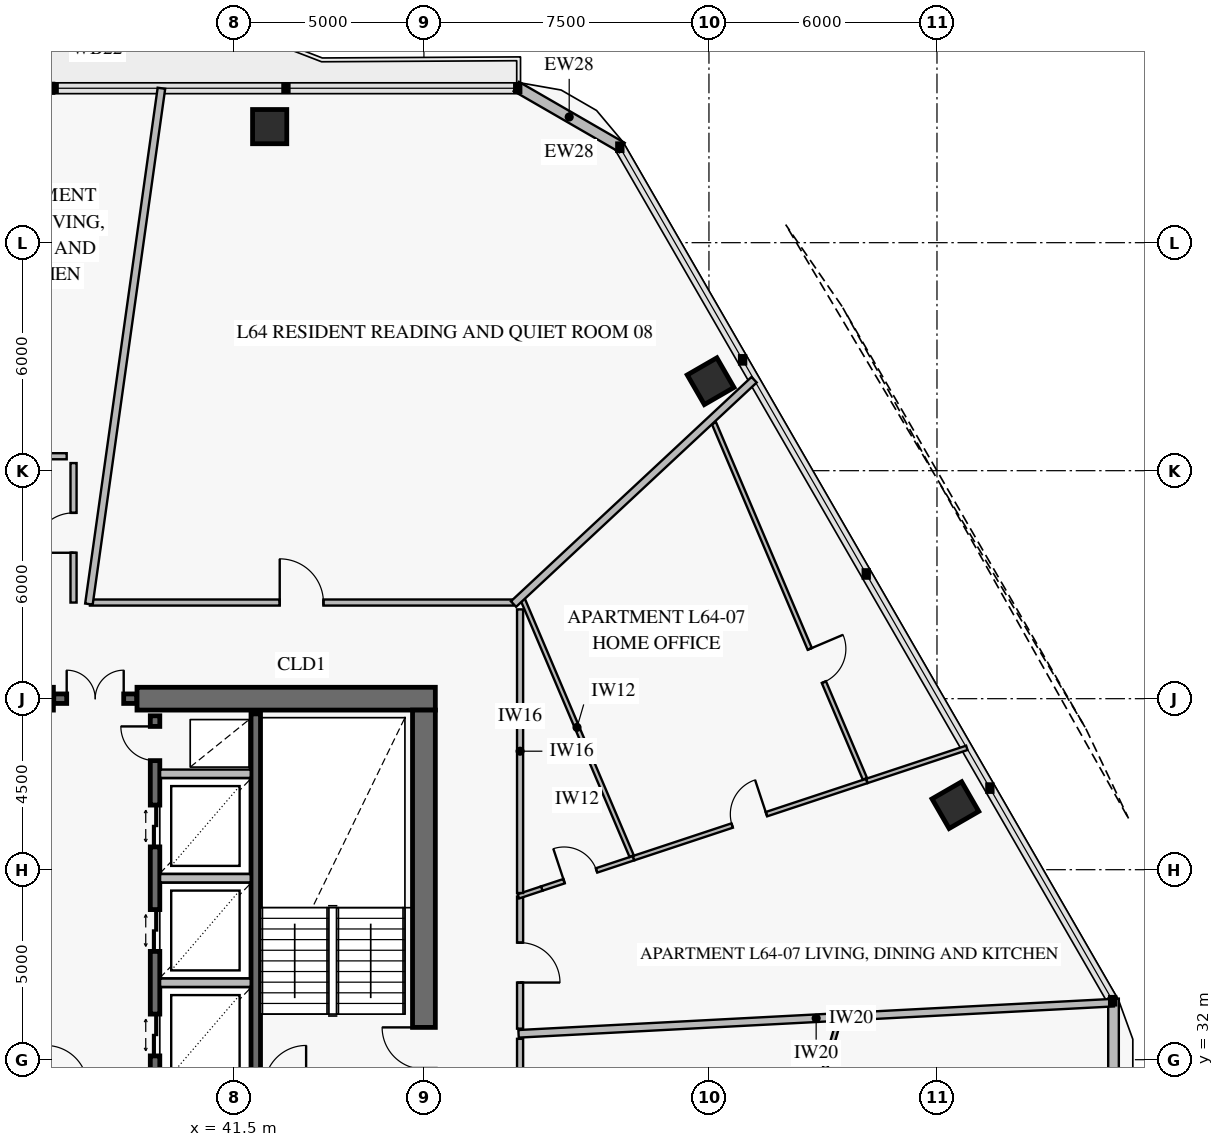
"""IFC4 building model, lengths in metres.
Left out: names, types, materials, properties, quantities, classifications, styles, units other than length and angle.
Written with IfcOpenShell. Run it as: python <this file> out.ifc"""

import sys

from ifc_helpers import new_model, si_unit, direction, frame, frame_2d, origin, origin_2d, place, context, subcontext, project, spatial, rectangle, extrude, element, fill, save


model = new_model("IFC4")
c1 = context("Model", 3, precision=1e-05, world=origin(), true_north=direction((0.0, 1.0)))
c2 = subcontext(c1, "Body", "Model", "MODEL_VIEW")
j1 = project(units=[si_unit("LENGTHUNIT", "METRE"), si_unit("PLANEANGLEUNIT", "RADIAN")], contexts=[c1])
p1 = place(None, origin())
s1 = spatial("IfcSite", under=j1, at=p1, CompositionType="ELEMENT")
p2 = place(p1, origin())
s2 = spatial("IfcBuilding", under=s1, at=p2, CompositionType="ELEMENT")
p3 = place(p2, frame((0.0, 0.0, 254.0)))
s3 = spatial("IfcBuildingStorey", under=s2, at=p3, CompositionType="ELEMENT", Elevation=254.0)
p4 = place(p3, frame((46.8, 41.5, 0.0), z_axis=(0.0, 0.0, 1.0), x_axis=(-1.0, 0.0, 0.0)))
e1 = element("IfcWall", 1, at=p4, inside=s3, PredefinedType="SHEAR", context=c2, shape_type="SweptSolid", body=[
    extrude(rectangle(XDim=7.85, YDim=0.6, at=frame_2d((3.925, 0.0))), origin(), (0.0, 0.0, 1.0), 3.8),
])
p5 = place(p3, frame((36.75, 41.5, 0.0), z_axis=(0.0, 0.0, 1.0), x_axis=(-1.0, 0.0, 0.0)))
e2 = element("IfcWall", 2, at=p5, inside=s3, PredefinedType="SHEAR", context=c2, shape_type="SweptSolid", body=[
    extrude(rectangle(XDim=11.55, YDim=0.6, at=frame_2d((5.775, 0.0))), origin(), (0.0, 0.0, 1.0), 3.8),
])
p6 = place(p5, frame((4.25, 0.0, 0.0)))
e3 = element("IfcOpeningElement", 3, at=p6, cuts=e2, PredefinedType="OPENING", context=c2, shape_type="SweptSolid", body=[
    extrude(rectangle(XDim=1.1, YDim=2.15, at=frame_2d((0.55, 1.075))), frame((0.0, 0.312, 0.0), z_axis=(0.0, -1.0, 0.0), x_axis=(1.0, 0.0, 0.0)), (0.0, 0.0, 1.0), 0.624),
])
p7 = place(p3, frame((46.5, 22.8, 0.0), z_axis=(0.0, 0.0, 1.0), x_axis=(0.0, 1.0, 0.0)))
e4 = element("IfcWall", 4, at=p7, inside=s3, PredefinedType="SHEAR", context=c2, shape_type="SweptSolid", body=[
    extrude(rectangle(XDim=18.4, YDim=0.6, at=frame_2d((9.2, 0.0))), origin(), (0.0, 0.0, 1.0), 3.8),
])
p8 = place(p7, frame((8.95, 0.0, 0.0)))
e5 = element("IfcOpeningElement", 5, at=p8, cuts=e4, PredefinedType="OPENING", context=c2, shape_type="SweptSolid", body=[
    extrude(rectangle(XDim=1.1, YDim=2.15, at=frame_2d((0.55, 1.075))), frame((0.0, 0.312, 0.0), z_axis=(0.0, -1.0, 0.0), x_axis=(1.0, 0.0, 0.0)), (0.0, 0.0, 1.0), 0.624),
])
for number, where, z_axis, x_axis in (
    (6, (60.485, 38.699, 0.0), (0.0, 0.0, 1.0), (-0.5, 0.866, 0.0)),
    (7, (54.044, 49.855, 0.0), (0.0, 0.0, 1.0), (-0.5, 0.866, 0.0)),
    (8, (42.441, 56.554, 0.0), (0.0, 0.0, 1.0), (-1.0, 0.0, 0.0)),
):
    element("IfcColumn", number, at=place(p3, frame(where, z_axis=z_axis, x_axis=x_axis)), inside=s3, PredefinedType="COLUMN", context=c2, shape_type="SweptSolid", body=[
        extrude(rectangle(XDim=0.9, YDim=0.9, at=origin_2d()), origin(), (0.0, 0.0, 1.0), 3.55),
    ])
p9 = place(p3, frame((34.98, 57.564, 0.0), z_axis=(0.0, 0.0, 1.0), x_axis=(1.0, 0.0, 0.0)))
e9 = element("IfcWall", 9, at=p9, inside=s3, PredefinedType="SOLIDWALL", context=c2, shape_type="SweptSolid", body=[
    extrude(rectangle(XDim=1.79, YDim=0.28, at=frame_2d((0.895, 0.0))), origin(), (0.0, 0.0, 1.0), 3.55),
])
p10 = place(p9, frame((0.345, 0.0, 0.0)))
e10 = element("IfcOpeningElement", 10, at=p10, cuts=e9, PredefinedType="OPENING", context=c2, shape_type="SweptSolid", body=[
    extrude(rectangle(XDim=1.1, YDim=2.2, at=frame_2d((0.55, 1.1))), frame((0.0, 0.152, 0.0), z_axis=(0.0, -1.0, 0.0), x_axis=(1.0, 0.0, 0.0)), (0.0, 0.0, 1.0), 0.304),
])
for number, where, z_axis, x_axis in (
    (11, (48.93, 57.611, 0.0), (0.0, 0.0, 1.0), (0.866, -0.5, 0.0)),
    (12, (64.645, 33.607, 0.0), (0.0, 0.0, 1.0), (0.0, -1.0, 0.0)),
):
    element("IfcWall", number, at=place(p3, frame(where, z_axis=z_axis, x_axis=x_axis)), inside=s3, PredefinedType="SOLIDWALL", context=c2, shape_type="SweptSolid", body=[
        extrude(rectangle(XDim=3.215, YDim=0.28, at=frame_2d((1.607, 0.0))), origin(), (0.0, 0.0, 1.0), 3.55),
    ])
p11 = place(p3, frame((36.76, 41.5, 0.0), z_axis=(0.0, 0.0, 1.0), x_axis=(1.0, 0.0, 0.0)))
e13 = element("IfcWall", 13, at=p11, inside=s3, PredefinedType="SOLIDWALL", context=c2, shape_type="SweptSolid", body=[
    extrude(rectangle(XDim=2.18, YDim=0.25, at=frame_2d((1.09, 0.0))), origin(), (0.0, 0.0, 1.0), 3.8),
])
p12 = place(p11, frame((0.34, 0.0, 0.0)))
e14 = element("IfcOpeningElement", 14, at=p12, cuts=e13, PredefinedType="OPENING", context=c2, shape_type="SweptSolid", body=[
    extrude(rectangle(XDim=1.5, YDim=2.15, at=frame_2d((0.75, 1.075))), frame((0.0, 0.137, 0.0), z_axis=(0.0, -1.0, 0.0), x_axis=(1.0, 0.0, 0.0)), (0.0, 0.0, 1.0), 0.274),
])
p13 = place(p3, frame((42.075, 31.4, 0.0), z_axis=(0.0, 0.0, 1.0), x_axis=(0.0, 1.0, 0.0)))
e15 = element("IfcWall", 15, at=p13, inside=s3, PredefinedType="SOLIDWALL", context=c2, shape_type="SweptSolid", body=[
    extrude(rectangle(XDim=9.7, YDim=0.25, at=frame_2d((4.85, 0.0))), origin(), (0.0, 0.0, 1.0), 3.8),
])
p14 = place(p3, frame((39.425, 31.4, 0.0), z_axis=(0.0, 0.0, 1.0), x_axis=(0.0, 1.0, 0.0)))
e16 = element("IfcWall", 16, at=p14, inside=s3, PredefinedType="SOLIDWALL", context=c2, shape_type="SweptSolid", body=[
    extrude(rectangle(XDim=9.65, YDim=0.25, at=frame_2d((4.825, 0.0))), origin(), (0.0, 0.0, 1.0), 3.8),
])
p15 = place(p14, frame((0.7, 0.0, 0.0)))
e17 = element("IfcOpeningElement", 17, at=p15, cuts=e16, PredefinedType="OPENING", context=c2, shape_type="SweptSolid", body=[
    extrude(rectangle(XDim=1.1, YDim=2.2, at=frame_2d((0.55, 1.1))), frame((0.0, 0.137, 0.0), z_axis=(0.0, -1.0, 0.0), x_axis=(1.0, 0.0, 0.0)), (0.0, 0.0, 1.0), 0.274),
])
p16 = place(p14, frame((3.45, 0.0, 0.0)))
e18 = element("IfcOpeningElement", 18, at=p16, cuts=e16, PredefinedType="OPENING", context=c2, shape_type="SweptSolid", body=[
    extrude(rectangle(XDim=1.1, YDim=2.2, at=frame_2d((0.55, 1.1))), frame((0.0, 0.137, 0.0), z_axis=(0.0, -1.0, 0.0), x_axis=(1.0, 0.0, 0.0)), (0.0, 0.0, 1.0), 0.274),
])
p17 = place(p14, frame((6.2, 0.0, 0.0)))
e19 = element("IfcOpeningElement", 19, at=p17, cuts=e16, PredefinedType="OPENING", context=c2, shape_type="SweptSolid", body=[
    extrude(rectangle(XDim=1.1, YDim=2.2, at=frame_2d((0.55, 1.1))), frame((0.0, 0.137, 0.0), z_axis=(0.0, -1.0, 0.0), x_axis=(1.0, 0.0, 0.0)), (0.0, 0.0, 1.0), 0.274),
])
p18 = place(p14, frame((8.47, 0.0, 0.0)))
e20 = element("IfcOpeningElement", 20, at=p18, cuts=e16, PredefinedType="OPENING", context=c2, shape_type="SweptSolid", body=[
    extrude(rectangle(XDim=0.9, YDim=2.1, at=frame_2d((0.45, 1.05))), frame((0.0, 0.137, 0.0), z_axis=(0.0, -1.0, 0.0), x_axis=(1.0, 0.0, 0.0)), (0.0, 0.0, 1.0), 0.274),
])
p19 = place(p3, frame((55.051, 24.793, 0.0), z_axis=(0.0, 0.0, 1.0), x_axis=(0.275631107549, 0.961263487578, 0.0)))
e21 = element("IfcWall", 21, at=p19, inside=s3, PredefinedType="PARTITIONING", context=c2, shape_type="SweptSolid", body=[
    extrude(rectangle(XDim=8.574, YDim=0.12, at=frame_2d((4.287, 0.0))), origin(), (0.0, 0.0, 1.0), 2.95),
])
p20 = place(p19, frame((1.413, 0.0, 0.0)))
e22 = element("IfcOpeningElement", 22, at=p20, cuts=e21, PredefinedType="OPENING", context=c2, shape_type="SweptSolid", body=[
    extrude(rectangle(XDim=0.95, YDim=2.1, at=frame_2d((0.475, 1.05))), frame((0.0, 0.072, 0.0), z_axis=(0.0, -1.0, 0.0), x_axis=(1.0, 0.0, 0.0)), (0.0, 0.0, 1.0), 0.144),
])
p21 = place(p19, frame((5.459, 0.0, 0.0)))
e23 = element("IfcOpeningElement", 23, at=p21, cuts=e21, PredefinedType="OPENING", context=c2, shape_type="SweptSolid", body=[
    extrude(rectangle(XDim=0.95, YDim=2.1, at=frame_2d((0.475, 1.05))), frame((0.0, 0.072, 0.0), z_axis=(0.0, -1.0, 0.0), x_axis=(1.0, 0.0, 0.0)), (0.0, 0.0, 1.0), 0.144),
])
p22 = place(p3, frame((49.6, 36.503, 0.0), z_axis=(0.0, 0.0, 1.0), x_axis=(0.949295505905, 0.314385181693, 0.0)))
e24 = element("IfcWall", 24, at=p22, inside=s3, PredefinedType="PARTITIONING", context=c2, shape_type="SweptSolid", body=[
    extrude(rectangle(XDim=2.545, YDim=0.12, at=frame_2d((1.272, 0.0))), origin(), (0.0, 0.0, 1.0), 3.55),
])
p23 = place(p22, frame((0.619, 0.0, 0.0)))
e25 = element("IfcOpeningElement", 25, at=p23, cuts=e24, PredefinedType="OPENING", context=c2, shape_type="SweptSolid", body=[
    extrude(rectangle(XDim=0.9, YDim=2.1, at=frame_2d((0.45, 1.05))), frame((0.0, 0.072, 0.0), z_axis=(0.0, -1.0, 0.0), x_axis=(1.0, 0.0, 0.0)), (0.0, 0.0, 1.0), 0.144),
])
p24 = place(p3, frame((52.016, 37.303, 0.0), z_axis=(0.0, 0.0, 1.0), x_axis=(0.949319431561, 0.314312928243, 0.0)))
e26 = element("IfcWall", 26, at=p24, inside=s3, PredefinedType="PARTITIONING", context=c2, shape_type="SweptSolid", body=[
    extrude(rectangle(XDim=6.466, YDim=0.12, at=frame_2d((3.233, 0.0))), origin(), (0.0, 0.0, 1.0), 3.15),
])
p25 = place(p24, frame((2.733, 0.0, 0.0)))
e27 = element("IfcOpeningElement", 27, at=p25, cuts=e26, PredefinedType="OPENING", context=c2, shape_type="SweptSolid", body=[
    extrude(rectangle(XDim=0.95, YDim=2.1, at=frame_2d((0.475, 1.05))), frame((0.0, 0.072, 0.0), z_axis=(0.0, -1.0, 0.0), x_axis=(1.0, 0.0, 0.0)), (0.0, 0.0, 1.0), 0.144),
])
p26 = place(p3, frame((58.104, 39.39, 0.0), z_axis=(0.0, 0.0, 1.0), x_axis=(-0.390729276491, 0.920505639577, 0.0)))
e28 = element("IfcWall", 28, at=p26, inside=s3, PredefinedType="PARTITIONING", context=c2, shape_type="SweptSolid", body=[
    extrude(rectangle(XDim=10.168, YDim=0.12, at=frame_2d((5.084, 0.0))), origin(), (0.0, 0.0, 1.0), 3.55),
])
p27 = place(p26, frame((2.765, 0.0, 0.0)))
e29 = element("IfcOpeningElement", 29, at=p27, cuts=e28, PredefinedType="OPENING", context=c2, shape_type="SweptSolid", body=[
    extrude(rectangle(XDim=0.95, YDim=2.1, at=frame_2d((0.475, 1.05))), frame((0.0, 0.072, 0.0), z_axis=(0.0, -1.0, 0.0), x_axis=(1.0, 0.0, 0.0)), (0.0, 0.0, 1.0), 0.144),
])
p28 = place(p3, frame((49.03, 32.817, 0.0), z_axis=(0.0, 0.0, 1.0), x_axis=(0.0, 1.0, 0.0)))
e30 = element("IfcWall", 30, at=p28, inside=s3, PredefinedType="PARTITIONING", context=c2, shape_type="SweptSolid", body=[
    extrude(rectangle(XDim=3.476, YDim=0.16, at=frame_2d((1.738, 0.0))), origin(), (0.0, 0.0, 1.0), 2.95),
])
p29 = place(p28, frame((1.213, 0.0, 0.0)))
e31 = element("IfcOpeningElement", 31, at=p29, cuts=e30, PredefinedType="OPENING", context=c2, shape_type="SweptSolid", body=[
    extrude(rectangle(XDim=1.05, YDim=2.15, at=frame_2d((0.525, 1.075))), frame((0.0, 0.092, 0.0), z_axis=(0.0, -1.0, 0.0), x_axis=(1.0, 0.0, 0.0)), (0.0, 0.0, 1.0), 0.184),
])
p30 = place(p3, frame((48.85, 44.03, 0.0), z_axis=(0.0, 0.0, 1.0), x_axis=(-1.0, 0.0, 0.0)))
e32 = element("IfcWall", 32, at=p30, inside=s3, PredefinedType="PARTITIONING", context=c2, shape_type="SweptSolid", body=[
    extrude(rectangle(XDim=11.139, YDim=0.16, at=frame_2d((5.57, 0.0))), origin(), (0.0, 0.0, 1.0), 2.95),
])
p31 = place(p30, frame((4.994, 0.0, 0.0)))
e33 = element("IfcOpeningElement", 33, at=p31, cuts=e32, PredefinedType="OPENING", context=c2, shape_type="SweptSolid", body=[
    extrude(rectangle(XDim=1.15, YDim=2.2, at=frame_2d((0.575, 1.1))), frame((0.0, 0.092, 0.0), z_axis=(0.0, -1.0, 0.0), x_axis=(1.0, 0.0, 0.0)), (0.0, 0.0, 1.0), 0.184),
])
p32 = place(p3, frame((37.28, 44.03, 0.0), z_axis=(0.0, 0.0, 1.0), x_axis=(0.0, 1.0, 0.0)))
e34 = element("IfcWall", 34, at=p32, inside=s3, PredefinedType="PARTITIONING", context=c2, shape_type="SweptSolid", body=[
    extrude(rectangle(XDim=3.67, YDim=0.16, at=frame_2d((1.835, 0.0))), origin(), (0.0, 0.0, 1.0), 3.55),
])
p33 = place(p32, frame((1.31, 0.0, 0.0)))
e35 = element("IfcOpeningElement", 35, at=p33, cuts=e34, PredefinedType="OPENING", context=c2, shape_type="SweptSolid", body=[
    extrude(rectangle(XDim=1.05, YDim=2.15, at=frame_2d((0.525, 1.075))), frame((0.0, 0.092, 0.0), z_axis=(0.0, -1.0, 0.0), x_axis=(1.0, 0.0, 0.0)), (0.0, 0.0, 1.0), 0.184),
])
for number, where, z_axis, x_axis in (
    (36, (39.558, 34.025, 0.0), (0.0, 0.0, 1.0), (1.0, 0.0, 0.0)),
    (37, (39.558, 36.775, 0.0), (0.0, 0.0, 1.0), (1.0, 0.0, 0.0)),
    (38, (39.558, 39.525, 0.0), (0.0, 0.0, 1.0), (1.0, 0.0, 0.0)),
):
    element("IfcWall", number, at=place(p3, frame(where, z_axis=z_axis, x_axis=x_axis)), inside=s3, PredefinedType="PARTITIONING", context=c2, shape_type="SweptSolid", body=[
        extrude(rectangle(XDim=2.384, YDim=0.22, at=frame_2d((1.192, 0.0))), origin(), (0.0, 0.0, 1.0), 3.55),
    ])
p34 = place(p3, frame((48.99, 32.681, 0.0), z_axis=(0.0, 0.0, 1.0), x_axis=(0.998629458789, 0.052337405734, 0.0)))
e39 = element("IfcWall", 39, at=p34, inside=s3, PredefinedType="PARTITIONING", context=c2, shape_type="SweptSolid", body=[
    extrude(rectangle(XDim=15.683, YDim=0.2, at=frame_2d((7.841, 0.0))), origin(), (0.0, 0.0, 1.0), 2.93),
])
p35 = place(p3, frame((48.986, 36.3, 0.0), z_axis=(0.0, 0.0, 1.0), x_axis=(0.94936083971, 0.314187835576, 0.0)))
e40 = element("IfcWall", 40, at=p35, inside=s3, PredefinedType="PARTITIONING", context=c2, shape_type="SweptSolid", body=[
    extrude(rectangle(XDim=0.646, YDim=0.12, at=frame_2d((0.323, 0.0))), origin(), (0.0, 0.0, 1.0), 3.55),
])
p36 = place(p3, frame((58.155, 39.336, 0.0), z_axis=(0.0, 0.0, 1.0), x_axis=(0.949341960768, 0.314244875098, 0.0)))
e41 = element("IfcWall", 41, at=p36, inside=s3, PredefinedType="PARTITIONING", context=c2, shape_type="SweptSolid", body=[
    extrude(rectangle(XDim=2.771, YDim=0.12, at=frame_2d((1.386, 0.0))), origin(), (0.0, 0.0, 1.0), 2.93),
])
p37 = place(p3, frame((51.966, 37.358, 0.0), z_axis=(0.0, 0.0, 1.0), x_axis=(-0.39073730392, 0.920502232113, 0.0)))
e42 = element("IfcWall", 42, at=p37, inside=s3, PredefinedType="PARTITIONING", context=c2, shape_type="SweptSolid", body=[
    extrude(rectangle(XDim=7.358, YDim=0.12, at=frame_2d((3.679, 0.0))), origin(), (0.0, 0.0, 1.0), 3.55),
])
p38 = place(p3, frame((48.857, 43.99, 0.0), z_axis=(0.0, 0.0, 1.0), x_axis=(0.731342217011, 0.682010675589, 0.0)))
e43 = element("IfcWall", 43, at=p38, inside=s3, PredefinedType="PARTITIONING", context=c2, shape_type="SweptSolid", body=[
    extrude(rectangle(XDim=8.656, YDim=0.2, at=frame_2d((4.328, 0.0))), origin(), (0.0, 0.0, 1.0), 2.93),
])
p39 = place(p3, frame((37.685, 43.99, 0.0), z_axis=(0.0, 0.0, 1.0), x_axis=(0.139176780606, 0.990267551594, 0.0)))
e44 = element("IfcWall", 44, at=p39, inside=s3, PredefinedType="PARTITIONING", context=c2, shape_type="SweptSolid", body=[
    extrude(rectangle(XDim=13.707, YDim=0.2, at=frame_2d((6.854, 0.0))), origin(), (0.0, 0.0, 1.0), 2.93),
])
p40 = place(p3, frame((49.03, 30.8, 0.0), z_axis=(0.0, 0.0, 1.0), x_axis=(0.0, 1.0, 0.0)))
e45 = element("IfcWall", 45, at=p40, inside=s3, PredefinedType="PARTITIONING", context=c2, shape_type="SweptSolid", body=[
    extrude(rectangle(XDim=1.749, YDim=0.16, at=frame_2d((0.875, 0.0))), origin(), (0.0, 0.0, 1.0), 3.55),
])
p41 = place(p3, frame((49.03, 36.386, 0.0), z_axis=(0.0, 0.0, 1.0), x_axis=(0.0, 1.0, 0.0)))
e46 = element("IfcWall", 46, at=p41, inside=s3, PredefinedType="PARTITIONING", context=c2, shape_type="SweptSolid", body=[
    extrude(rectangle(XDim=7.464, YDim=0.16, at=frame_2d((3.732, 0.0))), origin(), (0.0, 0.0, 1.0), 3.55),
])
p42 = place(p3, frame((37.1, 47.88, 0.0), z_axis=(0.0, 0.0, 1.0), x_axis=(-1.0, 0.0, 0.0)))
e47 = element("IfcWall", 47, at=p42, inside=s3, PredefinedType="PARTITIONING", context=c2, shape_type="SweptSolid", body=[
    extrude(rectangle(XDim=2.2, YDim=0.16, at=frame_2d((1.1, 0.0))), origin(), (0.0, 0.0, 1.0), 3.55),
])
p43 = place(p8, origin())
e48 = element("IfcDoor", 48, at=p43, inside=s3, OperationType="SINGLE_SWING_RIGHT", PredefinedType="USERDEFINED", context=c2, shape_type="SweptSolid", body=[
    extrude(rectangle(XDim=1.1, YDim=2.15, at=frame_2d((0.55, 1.075))), frame((0.0, 0.025, 0.0), z_axis=(0.0, -1.0, 0.0), x_axis=(1.0, 0.0, 0.0)), (0.0, 0.0, 1.0), 0.05),
])
fill(e5, e48)
p44 = place(p12, origin())
e49 = element("IfcDoor", 49, at=p44, inside=s3, OperationType="DOUBLE_DOOR_SINGLE_SWING", PredefinedType="DOOR", context=c2, shape_type="SweptSolid", body=[
    extrude(rectangle(XDim=1.5, YDim=2.15, at=frame_2d((0.75, 1.075))), frame((0.0, 0.025, 0.0), z_axis=(0.0, -1.0, 0.0), x_axis=(1.0, 0.0, 0.0)), (0.0, 0.0, 1.0), 0.05),
])
fill(e14, e49)
p45 = place(p15, origin())
e50 = element("IfcDoor", 50, at=p45, inside=s3, OperationType="DOUBLE_DOOR_SLIDING", PredefinedType="DOOR", context=c2, shape_type="SweptSolid", body=[
    extrude(rectangle(XDim=1.1, YDim=2.2, at=frame_2d((0.55, 1.1))), frame((0.0, 0.025, 0.0), z_axis=(0.0, -1.0, 0.0), x_axis=(1.0, 0.0, 0.0)), (0.0, 0.0, 1.0), 0.05),
])
fill(e17, e50)
p46 = place(p16, origin())
e51 = element("IfcDoor", 51, at=p46, inside=s3, OperationType="DOUBLE_DOOR_SLIDING", PredefinedType="DOOR", context=c2, shape_type="SweptSolid", body=[
    extrude(rectangle(XDim=1.1, YDim=2.2, at=frame_2d((0.55, 1.1))), frame((0.0, 0.025, 0.0), z_axis=(0.0, -1.0, 0.0), x_axis=(1.0, 0.0, 0.0)), (0.0, 0.0, 1.0), 0.05),
])
fill(e18, e51)
p47 = place(p17, origin())
e52 = element("IfcDoor", 52, at=p47, inside=s3, OperationType="DOUBLE_DOOR_SLIDING", PredefinedType="DOOR", context=c2, shape_type="SweptSolid", body=[
    extrude(rectangle(XDim=1.1, YDim=2.2, at=frame_2d((0.55, 1.1))), frame((0.0, 0.025, 0.0), z_axis=(0.0, -1.0, 0.0), x_axis=(1.0, 0.0, 0.0)), (0.0, 0.0, 1.0), 0.05),
])
fill(e19, e52)
p48 = place(p18, origin())
e53 = element("IfcDoor", 53, at=p48, inside=s3, OperationType="SINGLE_SWING_RIGHT", PredefinedType="DOOR", context=c2, shape_type="SweptSolid", body=[
    extrude(rectangle(XDim=0.9, YDim=2.1, at=frame_2d((0.45, 1.05))), frame((0.0, 0.025, 0.0), z_axis=(0.0, -1.0, 0.0), x_axis=(1.0, 0.0, 0.0)), (0.0, 0.0, 1.0), 0.05),
])
fill(e20, e53)
p49 = place(p23, origin())
e54 = element("IfcDoor", 54, at=p49, inside=s3, OperationType="SINGLE_SWING_LEFT", PredefinedType="DOOR", context=c2, shape_type="SweptSolid", body=[
    extrude(rectangle(XDim=0.9, YDim=2.1, at=frame_2d((0.45, 1.05))), frame((0.0, 0.025, 0.0), z_axis=(0.0, -1.0, 0.0), x_axis=(1.0, 0.0, 0.0)), (0.0, 0.0, 1.0), 0.05),
])
fill(e25, e54)
p50 = place(p25, origin())
e55 = element("IfcDoor", 55, at=p50, inside=s3, OperationType="SINGLE_SWING_RIGHT", PredefinedType="DOOR", context=c2, shape_type="SweptSolid", body=[
    extrude(rectangle(XDim=0.95, YDim=2.1, at=frame_2d((0.475, 1.05))), frame((0.0, 0.025, 0.0), z_axis=(0.0, -1.0, 0.0), x_axis=(1.0, 0.0, 0.0)), (0.0, 0.0, 1.0), 0.05),
])
fill(e27, e55)
p51 = place(p27, frame((0.95, 0.0, 0.0), z_axis=(0.0, 0.0, 1.0), x_axis=(-1.0, 0.0, 0.0)))
e56 = element("IfcDoor", 56, at=p51, inside=s3, OperationType="SINGLE_SWING_LEFT", PredefinedType="DOOR", context=c2, shape_type="SweptSolid", body=[
    extrude(rectangle(XDim=0.95, YDim=2.1, at=frame_2d((0.475, 1.05))), frame((0.0, 0.025, 0.0), z_axis=(0.0, -1.0, 0.0), x_axis=(1.0, 0.0, 0.0)), (0.0, 0.0, 1.0), 0.05),
])
fill(e29, e56)
p52 = place(p29, frame((1.05, 0.0, 0.0), z_axis=(0.0, 0.0, 1.0), x_axis=(-1.0, 0.0, 0.0)))
e57 = element("IfcDoor", 57, at=p52, inside=s3, OperationType="SINGLE_SWING_RIGHT", PredefinedType="DOOR", context=c2, shape_type="SweptSolid", body=[
    extrude(rectangle(XDim=1.05, YDim=2.15, at=frame_2d((0.525, 1.075))), frame((0.0, 0.025, 0.0), z_axis=(0.0, -1.0, 0.0), x_axis=(1.0, 0.0, 0.0)), (0.0, 0.0, 1.0), 0.05),
])
fill(e31, e57)
p53 = place(p31, frame((1.15, 0.0, 0.0), z_axis=(0.0, 0.0, 1.0), x_axis=(-1.0, 0.0, 0.0)))
e58 = element("IfcDoor", 58, at=p53, inside=s3, OperationType="SINGLE_SWING_LEFT", PredefinedType="DOOR", context=c2, shape_type="SweptSolid", body=[
    extrude(rectangle(XDim=1.15, YDim=2.2, at=frame_2d((0.575, 1.1))), frame((0.0, 0.025, 0.0), z_axis=(0.0, -1.0, 0.0), x_axis=(1.0, 0.0, 0.0)), (0.0, 0.0, 1.0), 0.05),
])
fill(e33, e58)
p54 = place(p33, origin())
e59 = element("IfcDoor", 59, at=p54, inside=s3, OperationType="SINGLE_SWING_LEFT", PredefinedType="DOOR", context=c2, shape_type="SweptSolid", body=[
    extrude(rectangle(XDim=1.05, YDim=2.15, at=frame_2d((0.525, 1.075))), frame((0.0, 0.025, 0.0), z_axis=(0.0, -1.0, 0.0), x_axis=(1.0, 0.0, 0.0)), (0.0, 0.0, 1.0), 0.05),
])
fill(e35, e59)
save(model, sys.argv[1])
